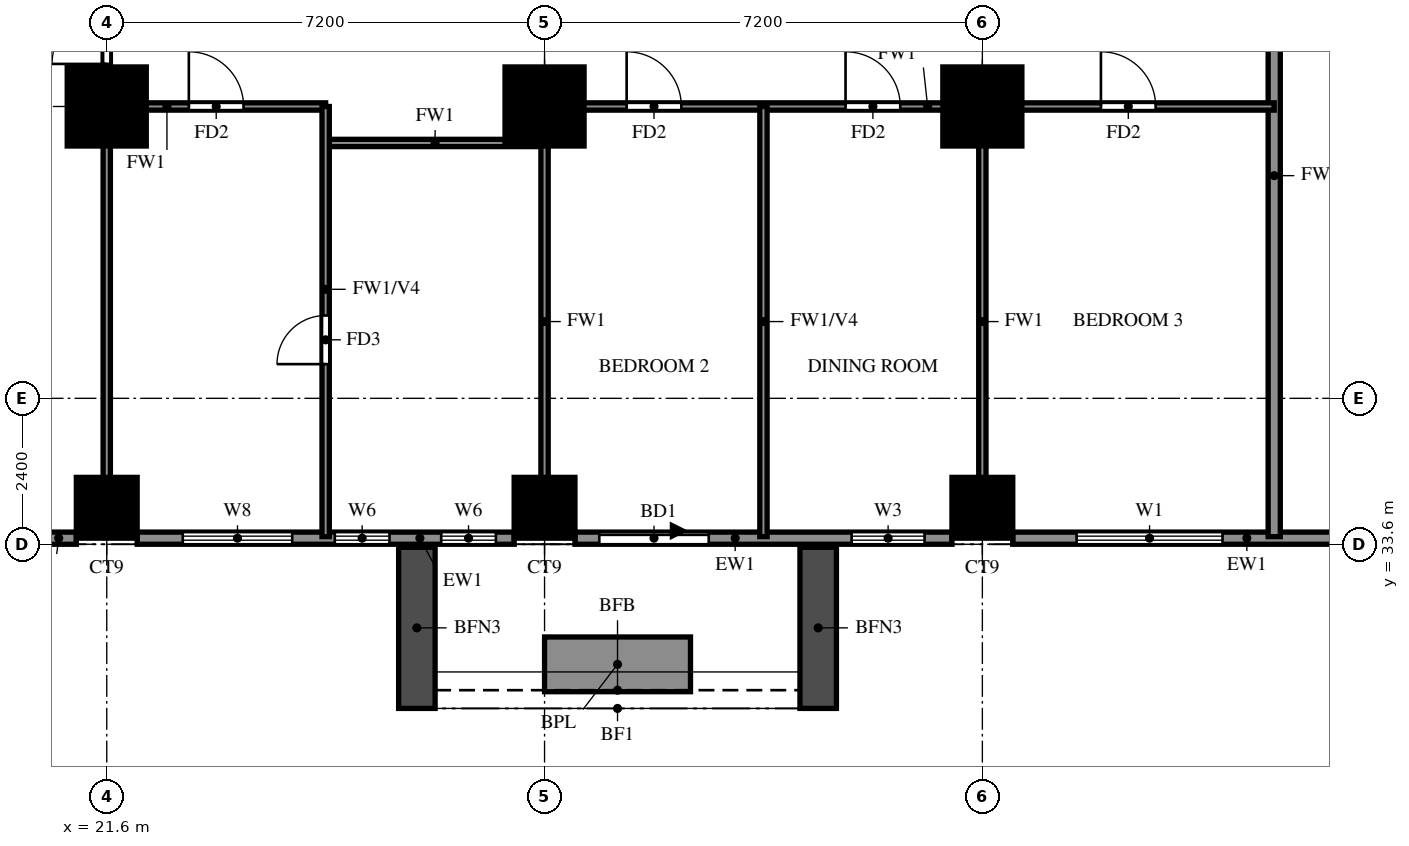
"""IFC4 building model, lengths in metres.
Left out: names, types, materials, properties, quantities, classifications, styles, units other than length and angle.
Written with IfcOpenShell. Run it as: python <this file> out.ifc"""

import sys

from ifc_helpers import new_model, si_unit, direction, frame, frame_2d, origin, origin_2d, place, context, subcontext, project, spatial, rectangle, extrude, source, transform, mapped, element, fill, save


model = new_model("IFC4")
c1 = context("Model", 3, precision=1e-05, world=origin(), true_north=direction((0.0, 1.0)))
c2 = subcontext(c1, "Body", "Model", "MODEL_VIEW")
j1 = project(units=[si_unit("LENGTHUNIT", "METRE"), si_unit("PLANEANGLEUNIT", "RADIAN")], contexts=[c1])
p1 = place(None, origin())
s1 = spatial("IfcSite", under=j1, at=p1, CompositionType="ELEMENT")
p2 = place(p1, origin())
s2 = spatial("IfcBuilding", under=s1, at=p2, CompositionType="ELEMENT")
p3 = place(p2, frame((0.0, 0.0, 86.5)))
s3 = spatial("IfcBuildingStorey", under=s2, at=p3, CompositionType="ELEMENT", Elevation=86.5)
m1 = source(origin(), c2, "Body", "SweptSolid", [
    extrude(rectangle(XDim=1.0, YDim=1.0, at=origin_2d()), origin(), (0.0, 0.0, 1.0), 3.18),
])
for number, where, z_axis, x_axis in (
    (1, (21.6, 34.2, 0.0), (0.0, 0.0, 1.0), (1.0, 0.0, 0.0)),
    (2, (28.8, 34.2, 0.0), (0.0, 0.0, 1.0), (1.0, 0.0, 0.0)),
    (3, (36.0, 34.2, 0.0), (0.0, 0.0, 1.0), (1.0, 0.0, 0.0)),
):
    element("IfcColumn", number, at=place(p3, frame(where, z_axis=z_axis, x_axis=x_axis)), inside=s3, PredefinedType="COLUMN", context=c2, shape_type="MappedRepresentation", body=[
        mapped(m1, transform((0.0, 0.0, 0.0))),
    ])
m2 = source(origin(), c2, "Body", "SweptSolid", [
    extrude(rectangle(XDim=1.3, YDim=1.3, at=origin_2d()), origin(), (0.0, 0.0, 1.0), 3.18),
])
for number, where, z_axis, x_axis in (
    (4, (21.6, 40.8, 0.0), (0.0, 0.0, 1.0), (1.0, 0.0, 0.0)),
    (5, (28.8, 40.8, 0.0), (0.0, 0.0, 1.0), (1.0, 0.0, 0.0)),
    (6, (36.0, 40.8, 0.0), (0.0, 0.0, 1.0), (1.0, 0.0, 0.0)),
):
    element("IfcColumn", number, at=place(p3, frame(where, z_axis=z_axis, x_axis=x_axis)), inside=s3, PredefinedType="COLUMN", context=c2, shape_type="MappedRepresentation", body=[
        mapped(m2, transform((0.0, 0.0, 0.0))),
    ])
p4 = place(p3, frame((18.2, 33.7, 0.0), z_axis=(0.0, 0.0, 1.0), x_axis=(1.0, 0.0, 0.0)))
e7 = element("IfcWall", 7, at=p4, inside=s3, PredefinedType="SOLIDWALL", context=c2, shape_type="SweptSolid", body=[
    extrude(rectangle(XDim=2.9, YDim=0.2, at=frame_2d((1.45, 0.0))), origin(), (0.0, 0.0, 1.0), 3.18),
])
p5 = place(p4, frame((0.55, 0.0, 0.6)))
e8 = element("IfcOpeningElement", 8, at=p5, cuts=e7, PredefinedType="OPENING", context=c2, shape_type="SweptSolid", body=[
    extrude(rectangle(XDim=1.8, YDim=2.4, at=frame_2d((0.9, 1.2))), frame((0.0, 0.11, 0.0), z_axis=(0.0, -1.0, 0.0), x_axis=(1.0, 0.0, 0.0)), (0.0, 0.0, 1.0), 0.22),
])
p6 = place(p3, frame((22.1, 33.7, 0.0), z_axis=(0.0, 0.0, 1.0), x_axis=(1.0, 0.0, 0.0)))
e9 = element("IfcWall", 9, at=p6, inside=s3, PredefinedType="SOLIDWALL", context=c2, shape_type="SweptSolid", body=[
    extrude(rectangle(XDim=6.2, YDim=0.2, at=frame_2d((3.1, 0.0))), origin(), (0.0, 0.0, 1.0), 3.18),
])
p7 = place(p6, frame((0.75, 0.0, 0.6)))
e10 = element("IfcOpeningElement", 10, at=p7, cuts=e9, PredefinedType="OPENING", context=c2, shape_type="SweptSolid", body=[
    extrude(rectangle(XDim=1.8, YDim=2.4, at=frame_2d((0.9, 1.2))), frame((0.0, 0.11, 0.0), z_axis=(0.0, -1.0, 0.0), x_axis=(1.0, 0.0, 0.0)), (0.0, 0.0, 1.0), 0.22),
])
p8 = place(p6, frame((3.25, 0.0, 1.5)))
e11 = element("IfcOpeningElement", 11, at=p8, cuts=e9, PredefinedType="OPENING", context=c2, shape_type="SweptSolid", body=[
    extrude(rectangle(XDim=0.9, YDim=0.9, at=frame_2d((0.45, 0.45))), frame((0.0, 0.11, 0.0), z_axis=(0.0, -1.0, 0.0), x_axis=(1.0, 0.0, 0.0)), (0.0, 0.0, 1.0), 0.22),
])
p9 = place(p6, frame((5.0, 0.0, 1.5)))
e12 = element("IfcOpeningElement", 12, at=p9, cuts=e9, PredefinedType="OPENING", context=c2, shape_type="SweptSolid", body=[
    extrude(rectangle(XDim=0.9, YDim=0.9, at=frame_2d((0.45, 0.45))), frame((0.0, 0.11, 0.0), z_axis=(0.0, -1.0, 0.0), x_axis=(1.0, 0.0, 0.0)), (0.0, 0.0, 1.0), 0.22),
])
p10 = place(p3, frame((29.3, 33.7, 0.0), z_axis=(0.0, 0.0, 1.0), x_axis=(1.0, 0.0, 0.0)))
e13 = element("IfcWall", 13, at=p10, inside=s3, PredefinedType="SOLIDWALL", context=c2, shape_type="SweptSolid", body=[
    extrude(rectangle(XDim=6.2, YDim=0.2, at=frame_2d((3.1, 0.0))), origin(), (0.0, 0.0, 1.0), 3.18),
])
p11 = place(p10, frame((0.4, 0.0, 0.0)))
e14 = element("IfcOpeningElement", 14, at=p11, cuts=e13, PredefinedType="OPENING", context=c2, shape_type="SweptSolid", body=[
    extrude(rectangle(XDim=1.8, YDim=2.4, at=frame_2d((0.9, 1.2))), frame((0.0, 0.11, 0.0), z_axis=(0.0, -1.0, 0.0), x_axis=(1.0, 0.0, 0.0)), (0.0, 0.0, 1.0), 0.22),
])
p12 = place(p10, frame((4.55, 0.0, 0.6)))
e15 = element("IfcOpeningElement", 15, at=p12, cuts=e13, PredefinedType="OPENING", context=c2, shape_type="SweptSolid", body=[
    extrude(rectangle(XDim=1.2, YDim=2.4, at=frame_2d((0.6, 1.2))), frame((0.0, 0.11, 0.0), z_axis=(0.0, -1.0, 0.0), x_axis=(1.0, 0.0, 0.0)), (0.0, 0.0, 1.0), 0.22),
])
p13 = place(p3, frame((36.5, 33.7, 0.0), z_axis=(0.0, 0.0, 1.0), x_axis=(1.0, 0.0, 0.0)))
e16 = element("IfcWall", 16, at=p13, inside=s3, PredefinedType="SOLIDWALL", context=c2, shape_type="SweptSolid", body=[
    extrude(rectangle(XDim=5.5, YDim=0.2, at=frame_2d((2.75, 0.0))), origin(), (0.0, 0.0, 1.0), 3.18),
])
p14 = place(p13, frame((1.05, 0.0, 0.6)))
e17 = element("IfcOpeningElement", 17, at=p14, cuts=e16, PredefinedType="OPENING", context=c2, shape_type="SweptSolid", body=[
    extrude(rectangle(XDim=2.4, YDim=2.4, at=frame_2d((1.2, 1.2))), frame((0.0, 0.11, 0.0), z_axis=(0.0, -1.0, 0.0), x_axis=(1.0, 0.0, 0.0)), (0.0, 0.0, 1.0), 0.22),
])
for number, where, z_axis, x_axis in (
    (18, (26.7, 33.55, 0.0), (0.0, 0.0, 1.0), (0.0, -1.0, 0.0)),
    (19, (33.3, 33.55, 0.0), (0.0, 0.0, 1.0), (0.0, -1.0, 0.0)),
):
    element("IfcWall", number, at=place(p3, frame(where, z_axis=z_axis, x_axis=x_axis)), inside=s3, PredefinedType="SOLIDWALL", context=c2, shape_type="SweptSolid", body=[
        extrude(rectangle(XDim=2.65, YDim=0.6, at=frame_2d((1.325, 0.0))), origin(), (0.0, 0.0, 1.0), 2.85),
    ])
p15 = place(p3, frame((28.8, 31.625, 0.0), z_axis=(0.0, 0.0, 1.0), x_axis=(1.0, 0.0, 0.0)))
e20 = element("IfcWall", 20, at=p15, inside=s3, PredefinedType="SOLIDWALL", context=c2, shape_type="SweptSolid", body=[
    extrude(rectangle(XDim=2.4, YDim=0.9, at=frame_2d((1.2, 0.0))), origin(), (0.0, 0.0, 1.0), 0.9),
])
p16 = place(p3, frame((40.8, 33.725, 0.0), z_axis=(0.0, 0.0, 1.0), x_axis=(0.0, 1.0, 0.0)))
e21 = element("IfcWall", 21, at=p16, inside=s3, PredefinedType="SOLIDWALL", context=c2, shape_type="SweptSolid", body=[
    extrude(rectangle(XDim=11.875, YDim=0.2, at=frame_2d((5.938, 0.0))), origin(), (0.0, 0.0, 1.0), 2.28),
])
p17 = place(p3, frame((25.2, 40.2, 0.0), z_axis=(0.0, 0.0, 1.0), x_axis=(1.0, 0.0, 0.0)))
e22 = element("IfcWall", 22, at=p17, inside=s3, PredefinedType="PARTITIONING", context=c2, shape_type="SweptSolid", body=[
    extrude(rectangle(XDim=3.6, YDim=0.12, at=frame_2d((1.8, 0.0))), origin(), (0.0, 0.0, 1.0), 3.18),
])
p18 = place(p3, frame((21.6, 40.8, 0.0), z_axis=(0.0, 0.0, 1.0), x_axis=(1.0, 0.0, 0.0)))
e23 = element("IfcWall", 23, at=p18, inside=s3, PredefinedType="PARTITIONING", context=c2, shape_type="SweptSolid", body=[
    extrude(rectangle(XDim=3.6, YDim=0.12, at=frame_2d((1.8, 0.0))), origin(), (0.0, 0.0, 1.0), 3.18),
])
p19 = place(p18, frame((1.35, 0.0, 0.0)))
e24 = element("IfcOpeningElement", 24, at=p19, cuts=e23, PredefinedType="OPENING", context=c2, shape_type="SweptSolid", body=[
    extrude(rectangle(XDim=0.9, YDim=2.1, at=frame_2d((0.45, 1.05))), frame((0.0, 0.07, 0.0), z_axis=(0.0, -1.0, 0.0), x_axis=(1.0, 0.0, 0.0)), (0.0, 0.0, 1.0), 0.14),
])
p20 = place(p3, frame((28.8, 40.8, 0.0), z_axis=(0.0, 0.0, 1.0), x_axis=(1.0, 0.0, 0.0)))
e25 = element("IfcWall", 25, at=p20, inside=s3, PredefinedType="PARTITIONING", context=c2, shape_type="SweptSolid", body=[
    extrude(rectangle(XDim=12.0, YDim=0.12, at=frame_2d((6.0, 0.0))), origin(), (0.0, 0.0, 1.0), 3.18),
])
p21 = place(p20, frame((1.35, 0.0, 0.0)))
e26 = element("IfcOpeningElement", 26, at=p21, cuts=e25, PredefinedType="OPENING", context=c2, shape_type="SweptSolid", body=[
    extrude(rectangle(XDim=0.9, YDim=2.1, at=frame_2d((0.45, 1.05))), frame((0.0, 0.07, 0.0), z_axis=(0.0, -1.0, 0.0), x_axis=(1.0, 0.0, 0.0)), (0.0, 0.0, 1.0), 0.14),
])
p22 = place(p20, frame((4.95, 0.0, 0.0)))
e27 = element("IfcOpeningElement", 27, at=p22, cuts=e25, PredefinedType="OPENING", context=c2, shape_type="SweptSolid", body=[
    extrude(rectangle(XDim=0.9, YDim=2.1, at=frame_2d((0.45, 1.05))), frame((0.0, 0.07, 0.0), z_axis=(0.0, -1.0, 0.0), x_axis=(1.0, 0.0, 0.0)), (0.0, 0.0, 1.0), 0.14),
])
p23 = place(p20, frame((9.15, 0.0, 0.0)))
e28 = element("IfcOpeningElement", 28, at=p23, cuts=e25, PredefinedType="OPENING", context=c2, shape_type="SweptSolid", body=[
    extrude(rectangle(XDim=0.9, YDim=2.1, at=frame_2d((0.45, 1.05))), frame((0.0, 0.07, 0.0), z_axis=(0.0, -1.0, 0.0), x_axis=(1.0, 0.0, 0.0)), (0.0, 0.0, 1.0), 0.14),
])
p24 = place(p3, frame((21.6, 33.725, 0.0), z_axis=(0.0, 0.0, 1.0), x_axis=(0.0, 1.0, 0.0)))
e29 = element("IfcWall", 29, at=p24, inside=s3, PredefinedType="PARTITIONING", context=c2, shape_type="SweptSolid", body=[
    extrude(rectangle(XDim=32.275, YDim=0.12, at=frame_2d((16.137, 0.0))), origin(), (0.0, 0.0, 1.0), 3.18),
])
p25 = place(p24, frame((7.775, 0.0, 0.0)))
e30 = element("IfcOpeningElement", 30, at=p25, cuts=e29, PredefinedType="OPENING", context=c2, shape_type="SweptSolid", body=[
    extrude(rectangle(XDim=0.9, YDim=2.1, at=frame_2d((0.45, 1.05))), frame((0.0, 0.07, 0.0), z_axis=(0.0, -1.0, 0.0), x_axis=(1.0, 0.0, 0.0)), (0.0, 0.0, 1.0), 0.14),
])
p26 = place(p24, frame((15.625, 0.0, 0.0)))
e31 = element("IfcOpeningElement", 31, at=p26, cuts=e29, PredefinedType="OPENING", context=c2, shape_type="SweptSolid", body=[
    extrude(rectangle(XDim=0.9, YDim=2.1, at=frame_2d((0.45, 1.05))), frame((0.0, 0.07, 0.0), z_axis=(0.0, -1.0, 0.0), x_axis=(1.0, 0.0, 0.0)), (0.0, 0.0, 1.0), 0.14),
])
p27 = place(p24, frame((22.225, 0.0, 0.0)))
e32 = element("IfcOpeningElement", 32, at=p27, cuts=e29, PredefinedType="OPENING", context=c2, shape_type="SweptSolid", body=[
    extrude(rectangle(XDim=1.5, YDim=2.1, at=frame_2d((0.75, 1.05))), frame((0.0, 0.07, 0.0), z_axis=(0.0, -1.0, 0.0), x_axis=(1.0, 0.0, 0.0)), (0.0, 0.0, 1.0), 0.14),
])
p28 = place(p24, frame((26.425, 0.0, 0.0)))
e33 = element("IfcOpeningElement", 33, at=p28, cuts=e29, PredefinedType="OPENING", context=c2, shape_type="SweptSolid", body=[
    extrude(rectangle(XDim=0.9, YDim=2.1, at=frame_2d((0.45, 1.05))), frame((0.0, 0.07, 0.0), z_axis=(0.0, -1.0, 0.0), x_axis=(1.0, 0.0, 0.0)), (0.0, 0.0, 1.0), 0.14),
])
p29 = place(p24, frame((30.025, 0.0, 0.0)))
e34 = element("IfcOpeningElement", 34, at=p29, cuts=e29, PredefinedType="OPENING", context=c2, shape_type="SweptSolid", body=[
    extrude(rectangle(XDim=0.9, YDim=2.1, at=frame_2d((0.45, 1.05))), frame((0.0, 0.07, 0.0), z_axis=(0.0, -1.0, 0.0), x_axis=(1.0, 0.0, 0.0)), (0.0, 0.0, 1.0), 0.14),
])
p30 = place(p3, frame((25.2, 33.725, 0.0), z_axis=(0.0, 0.0, 1.0), x_axis=(0.0, 1.0, 0.0)))
e35 = element("IfcWall", 35, at=p30, inside=s3, PredefinedType="PARTITIONING", context=c2, shape_type="SweptSolid", body=[
    extrude(rectangle(XDim=7.075, YDim=0.12, at=frame_2d((3.538, 0.0))), origin(), (0.0, 0.0, 1.0), 2.28),
])
p31 = place(p30, frame((2.837, 0.0, 0.0)))
e36 = element("IfcOpeningElement", 36, at=p31, cuts=e35, PredefinedType="OPENING", context=c2, shape_type="SweptSolid", body=[
    extrude(rectangle(XDim=0.8, YDim=2.1, at=frame_2d((0.4, 1.05))), frame((0.0, 0.07, 0.0), z_axis=(0.0, -1.0, 0.0), x_axis=(1.0, 0.0, 0.0)), (0.0, 0.0, 1.0), 0.14),
])
p32 = place(p3, frame((28.8, 33.725, 0.0), z_axis=(0.0, 0.0, 1.0), x_axis=(0.0, 1.0, 0.0)))
e37 = element("IfcWall", 37, at=p32, inside=s3, PredefinedType="PARTITIONING", context=c2, shape_type="SweptSolid", body=[
    extrude(rectangle(XDim=7.075, YDim=0.12, at=frame_2d((3.538, 0.0))), origin(), (0.0, 0.0, 1.0), 3.18),
])
p33 = place(p3, frame((32.4, 33.725, 0.0), z_axis=(0.0, 0.0, 1.0), x_axis=(0.0, 1.0, 0.0)))
e38 = element("IfcWall", 38, at=p33, inside=s3, PredefinedType="PARTITIONING", context=c2, shape_type="SweptSolid", body=[
    extrude(rectangle(XDim=7.075, YDim=0.12, at=frame_2d((3.538, 0.0))), origin(), (0.0, 0.0, 1.0), 2.28),
])
p34 = place(p3, frame((36.0, 33.725, 0.0), z_axis=(0.0, 0.0, 1.0), x_axis=(0.0, 1.0, 0.0)))
e39 = element("IfcWall", 39, at=p34, inside=s3, PredefinedType="PARTITIONING", context=c2, shape_type="SweptSolid", body=[
    extrude(rectangle(XDim=7.075, YDim=0.12, at=frame_2d((3.538, 0.0))), origin(), (0.0, 0.0, 1.0), 3.18),
])
p35 = place(p7, origin())
e40 = element("IfcWindow", 40, at=p35, inside=s3, PartitioningType="DOUBLE_PANEL_VERTICAL", PredefinedType="WINDOW", context=c2, shape_type="SweptSolid", body=[
    extrude(rectangle(XDim=1.8, YDim=2.4, at=frame_2d((0.9, 1.2))), frame((0.0, 0.03, 0.0), z_axis=(0.0, -1.0, 0.0), x_axis=(1.0, 0.0, 0.0)), (0.0, 0.0, 1.0), 0.06),
])
fill(e10, e40)
p36 = place(p8, origin())
e41 = element("IfcWindow", 41, at=p36, inside=s3, PartitioningType="SINGLE_PANEL", PredefinedType="WINDOW", context=c2, shape_type="SweptSolid", body=[
    extrude(rectangle(XDim=0.9, YDim=0.9, at=frame_2d((0.45, 0.45))), frame((0.0, 0.03, 0.0), z_axis=(0.0, -1.0, 0.0), x_axis=(1.0, 0.0, 0.0)), (0.0, 0.0, 1.0), 0.06),
])
fill(e11, e41)
p37 = place(p9, origin())
e42 = element("IfcWindow", 42, at=p37, inside=s3, PartitioningType="SINGLE_PANEL", PredefinedType="WINDOW", context=c2, shape_type="SweptSolid", body=[
    extrude(rectangle(XDim=0.9, YDim=0.9, at=frame_2d((0.45, 0.45))), frame((0.0, 0.03, 0.0), z_axis=(0.0, -1.0, 0.0), x_axis=(1.0, 0.0, 0.0)), (0.0, 0.0, 1.0), 0.06),
])
fill(e12, e42)
p38 = place(p11, origin())
e43 = element("IfcDoor", 43, at=p38, inside=s3, OperationType="DOUBLE_DOOR_SLIDING", PredefinedType="DOOR", context=c2, shape_type="SweptSolid", body=[
    extrude(rectangle(XDim=1.8, YDim=2.4, at=frame_2d((0.9, 1.2))), frame((0.0, 0.025, 0.0), z_axis=(0.0, -1.0, 0.0), x_axis=(1.0, 0.0, 0.0)), (0.0, 0.0, 1.0), 0.05),
])
fill(e14, e43)
p39 = place(p12, origin())
e44 = element("IfcWindow", 44, at=p39, inside=s3, PartitioningType="SINGLE_PANEL", PredefinedType="WINDOW", context=c2, shape_type="SweptSolid", body=[
    extrude(rectangle(XDim=1.2, YDim=2.4, at=frame_2d((0.6, 1.2))), frame((0.0, 0.03, 0.0), z_axis=(0.0, -1.0, 0.0), x_axis=(1.0, 0.0, 0.0)), (0.0, 0.0, 1.0), 0.06),
])
fill(e15, e44)
p40 = place(p14, origin())
e45 = element("IfcWindow", 45, at=p40, inside=s3, PartitioningType="DOUBLE_PANEL_VERTICAL", PredefinedType="WINDOW", context=c2, shape_type="SweptSolid", body=[
    extrude(rectangle(XDim=2.4, YDim=2.4, at=frame_2d((1.2, 1.2))), frame((0.0, 0.03, 0.0), z_axis=(0.0, -1.0, 0.0), x_axis=(1.0, 0.0, 0.0)), (0.0, 0.0, 1.0), 0.06),
])
fill(e17, e45)
p41 = place(p25, origin())
e46 = element("IfcDoor", 46, at=p41, inside=s3, OperationType="SINGLE_SWING_RIGHT", PredefinedType="DOOR", context=c2, shape_type="SweptSolid", body=[
    extrude(rectangle(XDim=0.9, YDim=2.1, at=frame_2d((0.45, 1.05))), frame((0.0, 0.025, 0.0), z_axis=(0.0, -1.0, 0.0), x_axis=(1.0, 0.0, 0.0)), (0.0, 0.0, 1.0), 0.05),
])
fill(e30, e46)
p42 = place(p19, origin())
e47 = element("IfcDoor", 47, at=p42, inside=s3, OperationType="SINGLE_SWING_RIGHT", PredefinedType="DOOR", context=c2, shape_type="SweptSolid", body=[
    extrude(rectangle(XDim=0.9, YDim=2.1, at=frame_2d((0.45, 1.05))), frame((0.0, 0.025, 0.0), z_axis=(0.0, -1.0, 0.0), x_axis=(1.0, 0.0, 0.0)), (0.0, 0.0, 1.0), 0.05),
])
fill(e24, e47)
p43 = place(p31, origin())
e48 = element("IfcDoor", 48, at=p43, inside=s3, OperationType="SINGLE_SWING_LEFT", PredefinedType="DOOR", context=c2, shape_type="SweptSolid", body=[
    extrude(rectangle(XDim=0.8, YDim=2.1, at=frame_2d((0.4, 1.05))), frame((0.0, 0.025, 0.0), z_axis=(0.0, -1.0, 0.0), x_axis=(1.0, 0.0, 0.0)), (0.0, 0.0, 1.0), 0.05),
])
fill(e36, e48)
p44 = place(p21, origin())
e49 = element("IfcDoor", 49, at=p44, inside=s3, OperationType="SINGLE_SWING_LEFT", PredefinedType="DOOR", context=c2, shape_type="SweptSolid", body=[
    extrude(rectangle(XDim=0.9, YDim=2.1, at=frame_2d((0.45, 1.05))), frame((0.0, 0.025, 0.0), z_axis=(0.0, -1.0, 0.0), x_axis=(1.0, 0.0, 0.0)), (0.0, 0.0, 1.0), 0.05),
])
fill(e26, e49)
p45 = place(p22, origin())
e50 = element("IfcDoor", 50, at=p45, inside=s3, OperationType="SINGLE_SWING_RIGHT", PredefinedType="DOOR", context=c2, shape_type="SweptSolid", body=[
    extrude(rectangle(XDim=0.9, YDim=2.1, at=frame_2d((0.45, 1.05))), frame((0.0, 0.025, 0.0), z_axis=(0.0, -1.0, 0.0), x_axis=(1.0, 0.0, 0.0)), (0.0, 0.0, 1.0), 0.05),
])
fill(e27, e50)
p46 = place(p23, origin())
e51 = element("IfcDoor", 51, at=p46, inside=s3, OperationType="SINGLE_SWING_LEFT", PredefinedType="DOOR", context=c2, shape_type="SweptSolid", body=[
    extrude(rectangle(XDim=0.9, YDim=2.1, at=frame_2d((0.45, 1.05))), frame((0.0, 0.025, 0.0), z_axis=(0.0, -1.0, 0.0), x_axis=(1.0, 0.0, 0.0)), (0.0, 0.0, 1.0), 0.05),
])
fill(e28, e51)
save(model, sys.argv[1])
